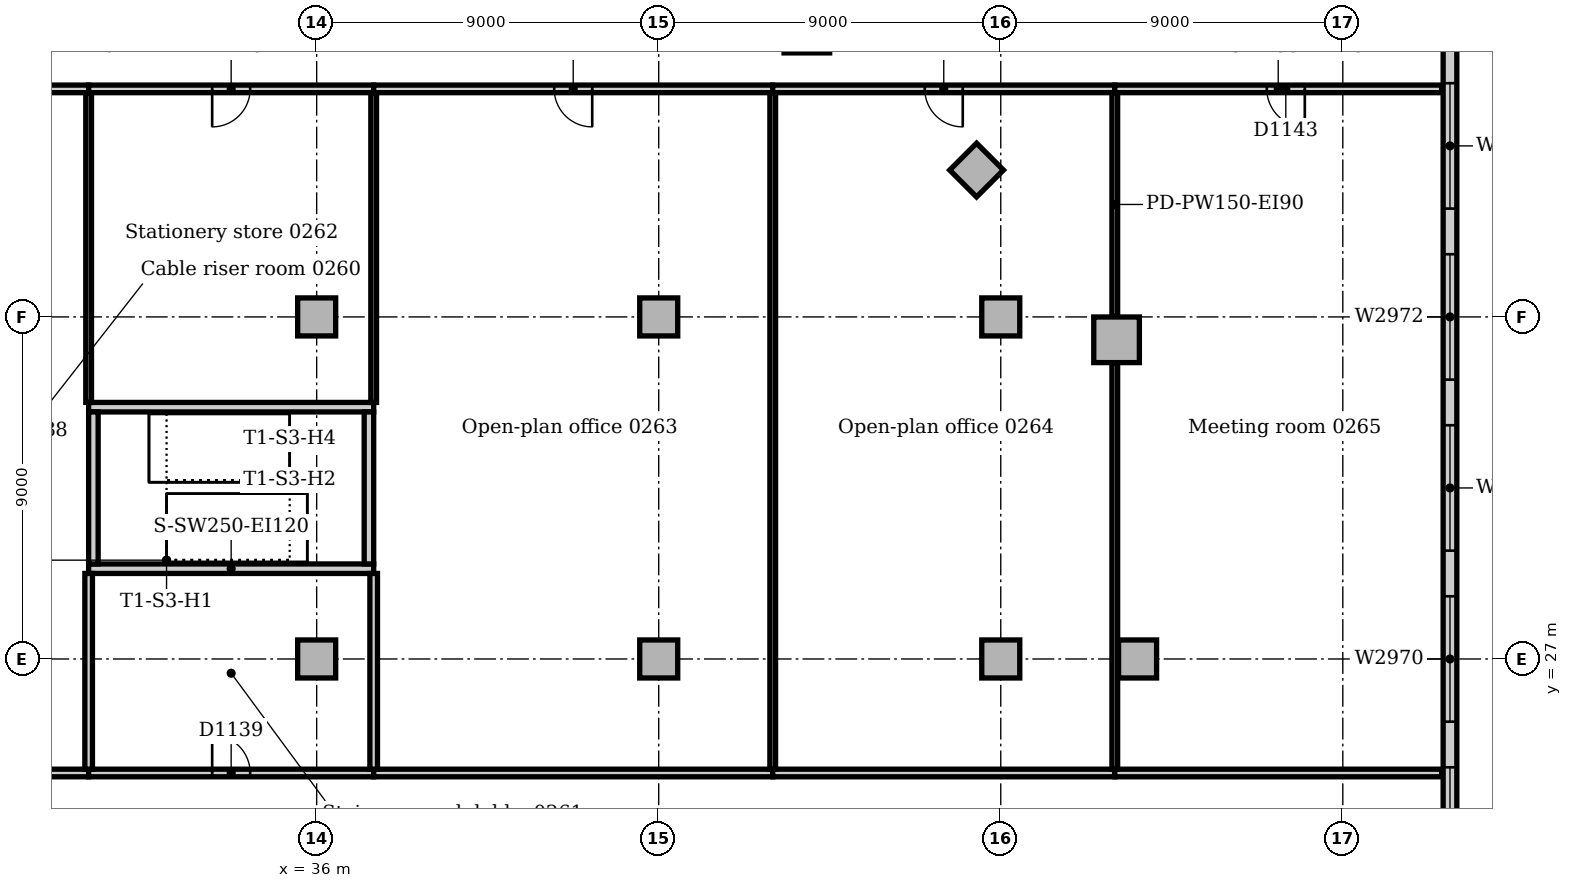
"""IFC4 building model, lengths in metres.
Left out: names, types, materials, properties, quantities, classifications, styles, units other than length and angle.
Written with IfcOpenShell. Run it as: python <this file> out.ifc"""

import sys

from ifc_helpers import new_model, si_unit, direction, frame, frame_2d, origin, origin_2d, place, context, subcontext, project, spatial, rectangle, extrude, element, fill, save


model = new_model("IFC4")
c1 = context("Model", 3, precision=1e-05, world=origin(), true_north=direction((0.0, 1.0)))
c2 = subcontext(c1, "Body", "Model", "MODEL_VIEW")
j1 = project(units=[si_unit("LENGTHUNIT", "METRE"), si_unit("PLANEANGLEUNIT", "RADIAN")], contexts=[c1])
p1 = place(None, origin())
s1 = spatial("IfcSite", under=j1, at=p1, CompositionType="ELEMENT")
p2 = place(p1, origin())
s2 = spatial("IfcBuilding", under=s1, at=p2, CompositionType="ELEMENT")
p3 = place(p2, frame((0.0, 0.0, 11.0)))
s3 = spatial("IfcBuildingStorey", under=s2, at=p3, CompositionType="ELEMENT", Elevation=11.0)
for number, where, z_axis, x_axis in (
    (1, (30.0, 29.375, 0.0), (0.0, 0.0, 1.0), (1.0, 0.0, 0.0)),
    (2, (37.5, 33.625, 0.0), (0.0, 0.0, 1.0), (-1.0, 0.0, 0.0)),
):
    element("IfcWall", number, at=place(p3, frame(where, z_axis=z_axis, x_axis=x_axis)), inside=s3, PredefinedType="SOLIDWALL", context=c2, shape_type="SweptSolid", body=[
        extrude(rectangle(XDim=7.5, YDim=0.25, at=frame_2d((3.75, 0.0))), origin(), (0.0, 0.0, 1.0), 5.0),
    ])
for number, where, z_axis, x_axis in (
    (3, (37.375, 29.5, 0.0), (0.0, 0.0, 1.0), (0.0, 1.0, 0.0)),
    (4, (30.125, 33.5, 0.0), (0.0, 0.0, 1.0), (0.0, -1.0, 0.0)),
):
    element("IfcWall", number, at=place(p3, frame(where, z_axis=z_axis, x_axis=x_axis)), inside=s3, PredefinedType="SOLIDWALL", context=c2, shape_type="SweptSolid", body=[
        extrude(rectangle(XDim=4.0, YDim=0.25, at=frame_2d((2.0, 0.0))), origin(), (0.0, 0.0, 1.0), 5.0),
    ])
for number, where, z_axis, x_axis in (
    (5, (57.047, 35.398, 0.0), (0.0, 0.0, 1.0), (1.0, 0.0, 0.0)),
    (6, (48.898, 43.547, 0.0), (0.0, 0.0, 1.0), (1.0, 0.0, 0.0)),
):
    element("IfcColumn", number, at=place(p3, frame(where, z_axis=z_axis, x_axis=x_axis)), inside=s3, PredefinedType="COLUMN", context=c2, shape_type="SweptSolid", body=[
        extrude(rectangle(XDim=1.2, YDim=1.2, at=origin_2d()), origin(), (0.0, 0.0, 1.0), 4.7),
    ])
for number, where, z_axis, x_axis in (
    (7, (57.6, 27.0, 0.0), (0.0, 0.0, 1.0), (1.0, 0.0, 0.0)),
    (8, (53.364, 39.864, 0.0), (0.0, 0.0, 1.0), (0.707, 0.707, 0.0)),
    (9, (36.0, 27.0, 0.0), (0.0, 0.0, 1.0), (1.0, 0.0, 0.0)),
    (10, (36.0, 36.0, 0.0), (0.0, 0.0, 1.0), (1.0, 0.0, 0.0)),
    (11, (45.0, 27.0, 0.0), (0.0, 0.0, 1.0), (1.0, 0.0, 0.0)),
    (12, (45.0, 36.0, 0.0), (0.0, 0.0, 1.0), (1.0, 0.0, 0.0)),
    (13, (54.0, 27.0, 0.0), (0.0, 0.0, 1.0), (1.0, 0.0, 0.0)),
    (14, (54.0, 36.0, 0.0), (0.0, 0.0, 1.0), (1.0, 0.0, 0.0)),
):
    element("IfcColumn", number, at=place(p3, frame(where, z_axis=z_axis, x_axis=x_axis)), inside=s3, PredefinedType="COLUMN", context=c2, shape_type="SweptSolid", body=[
        extrude(rectangle(XDim=1.0, YDim=1.0, at=origin_2d()), origin(), (0.0, 0.0, 1.0), 4.7),
    ])
p4 = place(p3, frame((65.82, -9.0, 0.0), z_axis=(0.0, 0.0, 1.0), x_axis=(0.0, 1.0, 0.0)))
e15 = element("IfcWall", 15, at=p4, inside=s3, PredefinedType="STANDARD", context=c2, shape_type="SweptSolid", body=[
    extrude(rectangle(XDim=63.0, YDim=0.36, at=frame_2d((31.5, 0.0))), origin(), (0.0, 0.0, 1.0), 4.7),
])
p5 = place(p4, frame((2.85, 0.0, 0.9)))
e16 = element("IfcOpeningElement", 16, at=p5, cuts=e15, PredefinedType="OPENING", context=c2, shape_type="SweptSolid", body=[
    extrude(rectangle(XDim=3.3, YDim=2.4, at=frame_2d((1.65, 1.2))), frame((0.0, 0.19, 0.0), z_axis=(0.0, -1.0, 0.0), x_axis=(1.0, 0.0, 0.0)), (0.0, 0.0, 1.0), 0.38),
])
p6 = place(p4, frame((7.35, 0.0, 0.9)))
e17 = element("IfcOpeningElement", 17, at=p6, cuts=e15, PredefinedType="OPENING", context=c2, shape_type="SweptSolid", body=[
    extrude(rectangle(XDim=3.3, YDim=2.4, at=frame_2d((1.65, 1.2))), frame((0.0, 0.19, 0.0), z_axis=(0.0, -1.0, 0.0), x_axis=(1.0, 0.0, 0.0)), (0.0, 0.0, 1.0), 0.38),
])
p7 = place(p4, frame((11.85, 0.0, 0.9)))
e18 = element("IfcOpeningElement", 18, at=p7, cuts=e15, PredefinedType="OPENING", context=c2, shape_type="SweptSolid", body=[
    extrude(rectangle(XDim=3.3, YDim=2.4, at=frame_2d((1.65, 1.2))), frame((0.0, 0.19, 0.0), z_axis=(0.0, -1.0, 0.0), x_axis=(1.0, 0.0, 0.0)), (0.0, 0.0, 1.0), 0.38),
])
p8 = place(p4, frame((16.35, 0.0, 0.9)))
e19 = element("IfcOpeningElement", 19, at=p8, cuts=e15, PredefinedType="OPENING", context=c2, shape_type="SweptSolid", body=[
    extrude(rectangle(XDim=3.3, YDim=2.4, at=frame_2d((1.65, 1.2))), frame((0.0, 0.19, 0.0), z_axis=(0.0, -1.0, 0.0), x_axis=(1.0, 0.0, 0.0)), (0.0, 0.0, 1.0), 0.38),
])
p9 = place(p4, frame((20.85, 0.0, 0.9)))
e20 = element("IfcOpeningElement", 20, at=p9, cuts=e15, PredefinedType="OPENING", context=c2, shape_type="SweptSolid", body=[
    extrude(rectangle(XDim=3.3, YDim=2.4, at=frame_2d((1.65, 1.2))), frame((0.0, 0.19, 0.0), z_axis=(0.0, -1.0, 0.0), x_axis=(1.0, 0.0, 0.0)), (0.0, 0.0, 1.0), 0.38),
])
p10 = place(p4, frame((25.35, 0.0, 0.9)))
e21 = element("IfcOpeningElement", 21, at=p10, cuts=e15, PredefinedType="OPENING", context=c2, shape_type="SweptSolid", body=[
    extrude(rectangle(XDim=3.3, YDim=2.4, at=frame_2d((1.65, 1.2))), frame((0.0, 0.19, 0.0), z_axis=(0.0, -1.0, 0.0), x_axis=(1.0, 0.0, 0.0)), (0.0, 0.0, 1.0), 0.38),
])
p11 = place(p4, frame((29.85, 0.0, 0.9)))
e22 = element("IfcOpeningElement", 22, at=p11, cuts=e15, PredefinedType="OPENING", context=c2, shape_type="SweptSolid", body=[
    extrude(rectangle(XDim=3.3, YDim=2.4, at=frame_2d((1.65, 1.2))), frame((0.0, 0.19, 0.0), z_axis=(0.0, -1.0, 0.0), x_axis=(1.0, 0.0, 0.0)), (0.0, 0.0, 1.0), 0.38),
])
p12 = place(p4, frame((34.35, 0.0, 0.9)))
e23 = element("IfcOpeningElement", 23, at=p12, cuts=e15, PredefinedType="OPENING", context=c2, shape_type="SweptSolid", body=[
    extrude(rectangle(XDim=3.3, YDim=2.4, at=frame_2d((1.65, 1.2))), frame((0.0, 0.19, 0.0), z_axis=(0.0, -1.0, 0.0), x_axis=(1.0, 0.0, 0.0)), (0.0, 0.0, 1.0), 0.38),
])
p13 = place(p4, frame((38.85, 0.0, 0.9)))
e24 = element("IfcOpeningElement", 24, at=p13, cuts=e15, PredefinedType="OPENING", context=c2, shape_type="SweptSolid", body=[
    extrude(rectangle(XDim=3.3, YDim=2.4, at=frame_2d((1.65, 1.2))), frame((0.0, 0.19, 0.0), z_axis=(0.0, -1.0, 0.0), x_axis=(1.0, 0.0, 0.0)), (0.0, 0.0, 1.0), 0.38),
])
p14 = place(p4, frame((43.35, 0.0, 0.9)))
e25 = element("IfcOpeningElement", 25, at=p14, cuts=e15, PredefinedType="OPENING", context=c2, shape_type="SweptSolid", body=[
    extrude(rectangle(XDim=3.3, YDim=2.4, at=frame_2d((1.65, 1.2))), frame((0.0, 0.19, 0.0), z_axis=(0.0, -1.0, 0.0), x_axis=(1.0, 0.0, 0.0)), (0.0, 0.0, 1.0), 0.38),
])
p15 = place(p4, frame((47.85, 0.0, 0.9)))
e26 = element("IfcOpeningElement", 26, at=p15, cuts=e15, PredefinedType="OPENING", context=c2, shape_type="SweptSolid", body=[
    extrude(rectangle(XDim=3.3, YDim=2.4, at=frame_2d((1.65, 1.2))), frame((0.0, 0.19, 0.0), z_axis=(0.0, -1.0, 0.0), x_axis=(1.0, 0.0, 0.0)), (0.0, 0.0, 1.0), 0.38),
])
p16 = place(p4, frame((52.35, 0.0, 0.9)))
e27 = element("IfcOpeningElement", 27, at=p16, cuts=e15, PredefinedType="OPENING", context=c2, shape_type="SweptSolid", body=[
    extrude(rectangle(XDim=3.3, YDim=2.4, at=frame_2d((1.65, 1.2))), frame((0.0, 0.19, 0.0), z_axis=(0.0, -1.0, 0.0), x_axis=(1.0, 0.0, 0.0)), (0.0, 0.0, 1.0), 0.38),
])
p17 = place(p4, frame((56.85, 0.0, 0.9)))
e28 = element("IfcOpeningElement", 28, at=p17, cuts=e15, PredefinedType="OPENING", context=c2, shape_type="SweptSolid", body=[
    extrude(rectangle(XDim=3.3, YDim=2.4, at=frame_2d((1.65, 1.2))), frame((0.0, 0.19, 0.0), z_axis=(0.0, -1.0, 0.0), x_axis=(1.0, 0.0, 0.0)), (0.0, 0.0, 1.0), 0.38),
])
p18 = place(p3, frame((26.9, 42.0, 0.0), z_axis=(0.0, 0.0, 1.0), x_axis=(1.0, 0.0, 0.0)))
e29 = element("IfcWall", 29, at=p18, inside=s3, PredefinedType="PARTITIONING", context=c2, shape_type="SweptSolid", body=[
    extrude(rectangle(XDim=3.1, YDim=0.2, at=frame_2d((1.55, 0.0))), origin(), (0.0, 0.0, 1.0), 4.7),
])
p19 = place(p3, frame((30.0, 42.0, 0.0), z_axis=(0.0, 0.0, 1.0), x_axis=(1.0, 0.0, 0.0)))
e30 = element("IfcWall", 30, at=p19, inside=s3, PredefinedType="PARTITIONING", context=c2, shape_type="SweptSolid", body=[
    extrude(rectangle(XDim=7.5, YDim=0.2, at=frame_2d((3.75, 0.0))), origin(), (0.0, 0.0, 1.0), 4.7),
])
p20 = place(p19, frame((3.25, 0.0, 0.0)))
e31 = element("IfcOpeningElement", 31, at=p20, cuts=e30, PredefinedType="OPENING", context=c2, shape_type="SweptSolid", body=[
    extrude(rectangle(XDim=1.0, YDim=2.1, at=frame_2d((0.5, 1.05))), frame((0.0, 0.11, 0.0), z_axis=(0.0, -1.0, 0.0), x_axis=(1.0, 0.0, 0.0)), (0.0, 0.0, 1.0), 0.22),
])
p21 = place(p3, frame((37.5, 42.0, 0.0), z_axis=(0.0, 0.0, 1.0), x_axis=(1.0, 0.0, 0.0)))
e32 = element("IfcWall", 32, at=p21, inside=s3, PredefinedType="PARTITIONING", context=c2, shape_type="SweptSolid", body=[
    extrude(rectangle(XDim=10.5, YDim=0.2, at=frame_2d((5.25, 0.0))), origin(), (0.0, 0.0, 1.0), 4.7),
])
p22 = place(p21, frame((4.75, 0.0, 0.0)))
e33 = element("IfcOpeningElement", 33, at=p22, cuts=e32, PredefinedType="OPENING", context=c2, shape_type="SweptSolid", body=[
    extrude(rectangle(XDim=1.0, YDim=2.1, at=frame_2d((0.5, 1.05))), frame((0.0, 0.11, 0.0), z_axis=(0.0, -1.0, 0.0), x_axis=(1.0, 0.0, 0.0)), (0.0, 0.0, 1.0), 0.22),
])
p23 = place(p3, frame((48.0, 42.0, 0.0), z_axis=(0.0, 0.0, 1.0), x_axis=(1.0, 0.0, 0.0)))
e34 = element("IfcWall", 34, at=p23, inside=s3, PredefinedType="PARTITIONING", context=c2, shape_type="SweptSolid", body=[
    extrude(rectangle(XDim=9.0, YDim=0.2, at=frame_2d((4.5, 0.0))), origin(), (0.0, 0.0, 1.0), 4.7),
])
p24 = place(p23, frame((4.0, 0.0, 0.0)))
e35 = element("IfcOpeningElement", 35, at=p24, cuts=e34, PredefinedType="OPENING", context=c2, shape_type="SweptSolid", body=[
    extrude(rectangle(XDim=1.0, YDim=2.1, at=frame_2d((0.5, 1.05))), frame((0.0, 0.11, 0.0), z_axis=(0.0, -1.0, 0.0), x_axis=(1.0, 0.0, 0.0)), (0.0, 0.0, 1.0), 0.22),
])
p25 = place(p3, frame((57.0, 42.0, 0.0), z_axis=(0.0, 0.0, 1.0), x_axis=(1.0, 0.0, 0.0)))
e36 = element("IfcWall", 36, at=p25, inside=s3, PredefinedType="PARTITIONING", context=c2, shape_type="SweptSolid", body=[
    extrude(rectangle(XDim=8.6, YDim=0.2, at=frame_2d((4.3, 0.0))), origin(), (0.0, 0.0, 1.0), 4.7),
])
p26 = place(p25, frame((4.0, 0.0, 0.0)))
e37 = element("IfcOpeningElement", 37, at=p26, cuts=e36, PredefinedType="OPENING", context=c2, shape_type="SweptSolid", body=[
    extrude(rectangle(XDim=1.0, YDim=2.1, at=frame_2d((0.5, 1.05))), frame((0.0, 0.11, 0.0), z_axis=(0.0, -1.0, 0.0), x_axis=(1.0, 0.0, 0.0)), (0.0, 0.0, 1.0), 0.22),
])
p27 = place(p3, frame((26.9, 24.0, 0.0), z_axis=(0.0, 0.0, 1.0), x_axis=(1.0, 0.0, 0.0)))
e38 = element("IfcWall", 38, at=p27, inside=s3, PredefinedType="PARTITIONING", context=c2, shape_type="SweptSolid", body=[
    extrude(rectangle(XDim=3.1, YDim=0.2, at=frame_2d((1.55, 0.0))), origin(), (0.0, 0.0, 1.0), 4.7),
])
p28 = place(p3, frame((30.0, 24.0, 0.0), z_axis=(0.0, 0.0, 1.0), x_axis=(1.0, 0.0, 0.0)))
e39 = element("IfcWall", 39, at=p28, inside=s3, PredefinedType="PARTITIONING", context=c2, shape_type="SweptSolid", body=[
    extrude(rectangle(XDim=7.5, YDim=0.2, at=frame_2d((3.75, 0.0))), origin(), (0.0, 0.0, 1.0), 4.7),
])
p29 = place(p28, frame((3.25, 0.0, 0.0)))
e40 = element("IfcOpeningElement", 40, at=p29, cuts=e39, PredefinedType="OPENING", context=c2, shape_type="SweptSolid", body=[
    extrude(rectangle(XDim=1.0, YDim=2.1, at=frame_2d((0.5, 1.05))), frame((0.0, 0.11, 0.0), z_axis=(0.0, -1.0, 0.0), x_axis=(1.0, 0.0, 0.0)), (0.0, 0.0, 1.0), 0.22),
])
p30 = place(p3, frame((37.5, 24.0, 0.0), z_axis=(0.0, 0.0, 1.0), x_axis=(1.0, 0.0, 0.0)))
e41 = element("IfcWall", 41, at=p30, inside=s3, PredefinedType="PARTITIONING", context=c2, shape_type="SweptSolid", body=[
    extrude(rectangle(XDim=10.5, YDim=0.2, at=frame_2d((5.25, 0.0))), origin(), (0.0, 0.0, 1.0), 4.7),
])
p31 = place(p3, frame((48.0, 24.0, 0.0), z_axis=(0.0, 0.0, 1.0), x_axis=(1.0, 0.0, 0.0)))
e42 = element("IfcWall", 42, at=p31, inside=s3, PredefinedType="PARTITIONING", context=c2, shape_type="SweptSolid", body=[
    extrude(rectangle(XDim=9.0, YDim=0.2, at=frame_2d((4.5, 0.0))), origin(), (0.0, 0.0, 1.0), 4.7),
])
p32 = place(p3, frame((57.0, 24.0, 0.0), z_axis=(0.0, 0.0, 1.0), x_axis=(1.0, 0.0, 0.0)))
e43 = element("IfcWall", 43, at=p32, inside=s3, PredefinedType="PARTITIONING", context=c2, shape_type="SweptSolid", body=[
    extrude(rectangle(XDim=8.6, YDim=0.2, at=frame_2d((4.3, 0.0))), origin(), (0.0, 0.0, 1.0), 4.7),
])
p33 = place(p3, frame((30.0, 24.1, 0.0), z_axis=(0.0, 0.0, 1.0), x_axis=(0.0, 1.0, 0.0)))
e44 = element("IfcWall", 44, at=p33, inside=s3, PredefinedType="PARTITIONING", context=c2, shape_type="SweptSolid", body=[
    extrude(rectangle(XDim=5.15, YDim=0.2, at=frame_2d((2.575, 0.0))), origin(), (0.0, 0.0, 1.0), 4.7),
])
p34 = place(p3, frame((30.0, 33.75, 0.0), z_axis=(0.0, 0.0, 1.0), x_axis=(0.0, 1.0, 0.0)))
e45 = element("IfcWall", 45, at=p34, inside=s3, PredefinedType="PARTITIONING", context=c2, shape_type="SweptSolid", body=[
    extrude(rectangle(XDim=8.15, YDim=0.15, at=frame_2d((4.075, 0.0))), origin(), (0.0, 0.0, 1.0), 4.7),
])
p35 = place(p3, frame((37.5, 24.1, 0.0), z_axis=(0.0, 0.0, 1.0), x_axis=(0.0, 1.0, 0.0)))
e46 = element("IfcWall", 46, at=p35, inside=s3, PredefinedType="PARTITIONING", context=c2, shape_type="SweptSolid", body=[
    extrude(rectangle(XDim=5.15, YDim=0.2, at=frame_2d((2.575, 0.0))), origin(), (0.0, 0.0, 1.0), 4.7),
])
p36 = place(p3, frame((37.5, 33.75, 0.0), z_axis=(0.0, 0.0, 1.0), x_axis=(0.0, 1.0, 0.0)))
e47 = element("IfcWall", 47, at=p36, inside=s3, PredefinedType="PARTITIONING", context=c2, shape_type="SweptSolid", body=[
    extrude(rectangle(XDim=8.15, YDim=0.15, at=frame_2d((4.075, 0.0))), origin(), (0.0, 0.0, 1.0), 4.7),
])
p37 = place(p3, frame((48.0, 24.1, 0.0), z_axis=(0.0, 0.0, 1.0), x_axis=(0.0, 1.0, 0.0)))
e48 = element("IfcWall", 48, at=p37, inside=s3, PredefinedType="PARTITIONING", context=c2, shape_type="SweptSolid", body=[
    extrude(rectangle(XDim=17.8, YDim=0.15, at=frame_2d((8.9, 0.0))), origin(), (0.0, 0.0, 1.0), 4.7),
])
p38 = place(p3, frame((57.0, 24.1, 0.0), z_axis=(0.0, 0.0, 1.0), x_axis=(0.0, 1.0, 0.0)))
e49 = element("IfcWall", 49, at=p38, inside=s3, PredefinedType="PARTITIONING", context=c2, shape_type="SweptSolid", body=[
    extrude(rectangle(XDim=10.678, YDim=0.15, at=frame_2d((5.339, 0.0))), origin(), (0.0, 0.0, 1.0), 4.7),
])
p39 = place(p3, frame((57.0, 36.018, 0.0), z_axis=(0.0, 0.0, 1.0), x_axis=(0.0, 1.0, 0.0)))
e50 = element("IfcWall", 50, at=p39, inside=s3, PredefinedType="PARTITIONING", context=c2, shape_type="SweptSolid", body=[
    extrude(rectangle(XDim=5.882, YDim=0.15, at=frame_2d((2.941, 0.0))), origin(), (0.0, 0.0, 1.0), 4.7),
])
p40 = place(p11, origin())
e51 = element("IfcWindow", 51, at=p40, inside=s3, PartitioningType="SINGLE_PANEL", PredefinedType="WINDOW", context=c2, shape_type="SweptSolid", body=[
    extrude(rectangle(XDim=3.3, YDim=2.4, at=frame_2d((1.65, 1.2))), frame((0.0, 0.13, 0.0), z_axis=(0.0, -1.0, 0.0), x_axis=(1.0, 0.0, 0.0)), (0.0, 0.0, 1.0), 0.06),
])
fill(e22, e51)
p41 = place(p12, origin())
e52 = element("IfcWindow", 52, at=p41, inside=s3, PartitioningType="SINGLE_PANEL", PredefinedType="WINDOW", context=c2, shape_type="SweptSolid", body=[
    extrude(rectangle(XDim=3.3, YDim=2.4, at=frame_2d((1.65, 1.2))), frame((0.0, 0.13, 0.0), z_axis=(0.0, -1.0, 0.0), x_axis=(1.0, 0.0, 0.0)), (0.0, 0.0, 1.0), 0.06),
])
fill(e23, e52)
p42 = place(p13, origin())
e53 = element("IfcWindow", 53, at=p42, inside=s3, PartitioningType="SINGLE_PANEL", PredefinedType="WINDOW", context=c2, shape_type="SweptSolid", body=[
    extrude(rectangle(XDim=3.3, YDim=2.4, at=frame_2d((1.65, 1.2))), frame((0.0, 0.13, 0.0), z_axis=(0.0, -1.0, 0.0), x_axis=(1.0, 0.0, 0.0)), (0.0, 0.0, 1.0), 0.06),
])
fill(e24, e53)
p43 = place(p14, origin())
e54 = element("IfcWindow", 54, at=p43, inside=s3, PartitioningType="SINGLE_PANEL", PredefinedType="WINDOW", context=c2, shape_type="SweptSolid", body=[
    extrude(rectangle(XDim=3.3, YDim=2.4, at=frame_2d((1.65, 1.2))), frame((0.0, 0.13, 0.0), z_axis=(0.0, -1.0, 0.0), x_axis=(1.0, 0.0, 0.0)), (0.0, 0.0, 1.0), 0.06),
])
fill(e25, e54)
p44 = place(p15, origin())
e55 = element("IfcWindow", 55, at=p44, inside=s3, PartitioningType="SINGLE_PANEL", PredefinedType="WINDOW", context=c2, shape_type="SweptSolid", body=[
    extrude(rectangle(XDim=3.3, YDim=2.4, at=frame_2d((1.65, 1.2))), frame((0.0, 0.13, 0.0), z_axis=(0.0, -1.0, 0.0), x_axis=(1.0, 0.0, 0.0)), (0.0, 0.0, 1.0), 0.06),
])
fill(e26, e55)
p45 = place(p29, origin())
e56 = element("IfcDoor", 56, at=p45, inside=s3, OperationType="SINGLE_SWING_LEFT", PredefinedType="DOOR", context=c2, shape_type="SweptSolid", body=[
    extrude(rectangle(XDim=1.0, YDim=2.1, at=frame_2d((0.5, 1.05))), frame((0.0, 0.025, 0.0), z_axis=(0.0, -1.0, 0.0), x_axis=(1.0, 0.0, 0.0)), (0.0, 0.0, 1.0), 0.05),
])
fill(e40, e56)
p46 = place(p20, frame((1.0, 0.0, 0.0), z_axis=(0.0, 0.0, 1.0), x_axis=(-1.0, 0.0, 0.0)))
e57 = element("IfcDoor", 57, at=p46, inside=s3, OperationType="SINGLE_SWING_RIGHT", PredefinedType="DOOR", context=c2, shape_type="SweptSolid", body=[
    extrude(rectangle(XDim=1.0, YDim=2.1, at=frame_2d((0.5, 1.05))), frame((0.0, 0.025, 0.0), z_axis=(0.0, -1.0, 0.0), x_axis=(1.0, 0.0, 0.0)), (0.0, 0.0, 1.0), 0.05),
])
fill(e31, e57)
p47 = place(p22, frame((1.0, 0.0, 0.0), z_axis=(0.0, 0.0, 1.0), x_axis=(-1.0, 0.0, 0.0)))
e58 = element("IfcDoor", 58, at=p47, inside=s3, OperationType="SINGLE_SWING_LEFT", PredefinedType="DOOR", context=c2, shape_type="SweptSolid", body=[
    extrude(rectangle(XDim=1.0, YDim=2.1, at=frame_2d((0.5, 1.05))), frame((0.0, 0.025, 0.0), z_axis=(0.0, -1.0, 0.0), x_axis=(1.0, 0.0, 0.0)), (0.0, 0.0, 1.0), 0.05),
])
fill(e33, e58)
p48 = place(p24, frame((1.0, 0.0, 0.0), z_axis=(0.0, 0.0, 1.0), x_axis=(-1.0, 0.0, 0.0)))
e59 = element("IfcDoor", 59, at=p48, inside=s3, OperationType="SINGLE_SWING_LEFT", PredefinedType="DOOR", context=c2, shape_type="SweptSolid", body=[
    extrude(rectangle(XDim=1.0, YDim=2.1, at=frame_2d((0.5, 1.05))), frame((0.0, 0.025, 0.0), z_axis=(0.0, -1.0, 0.0), x_axis=(1.0, 0.0, 0.0)), (0.0, 0.0, 1.0), 0.05),
])
fill(e35, e59)
p49 = place(p26, frame((1.0, 0.0, 0.0), z_axis=(0.0, 0.0, 1.0), x_axis=(-1.0, 0.0, 0.0)))
e60 = element("IfcDoor", 60, at=p49, inside=s3, OperationType="SINGLE_SWING_LEFT", PredefinedType="DOOR", context=c2, shape_type="SweptSolid", body=[
    extrude(rectangle(XDim=1.0, YDim=2.1, at=frame_2d((0.5, 1.05))), frame((0.0, 0.025, 0.0), z_axis=(0.0, -1.0, 0.0), x_axis=(1.0, 0.0, 0.0)), (0.0, 0.0, 1.0), 0.05),
])
fill(e37, e60)
save(model, sys.argv[1])
